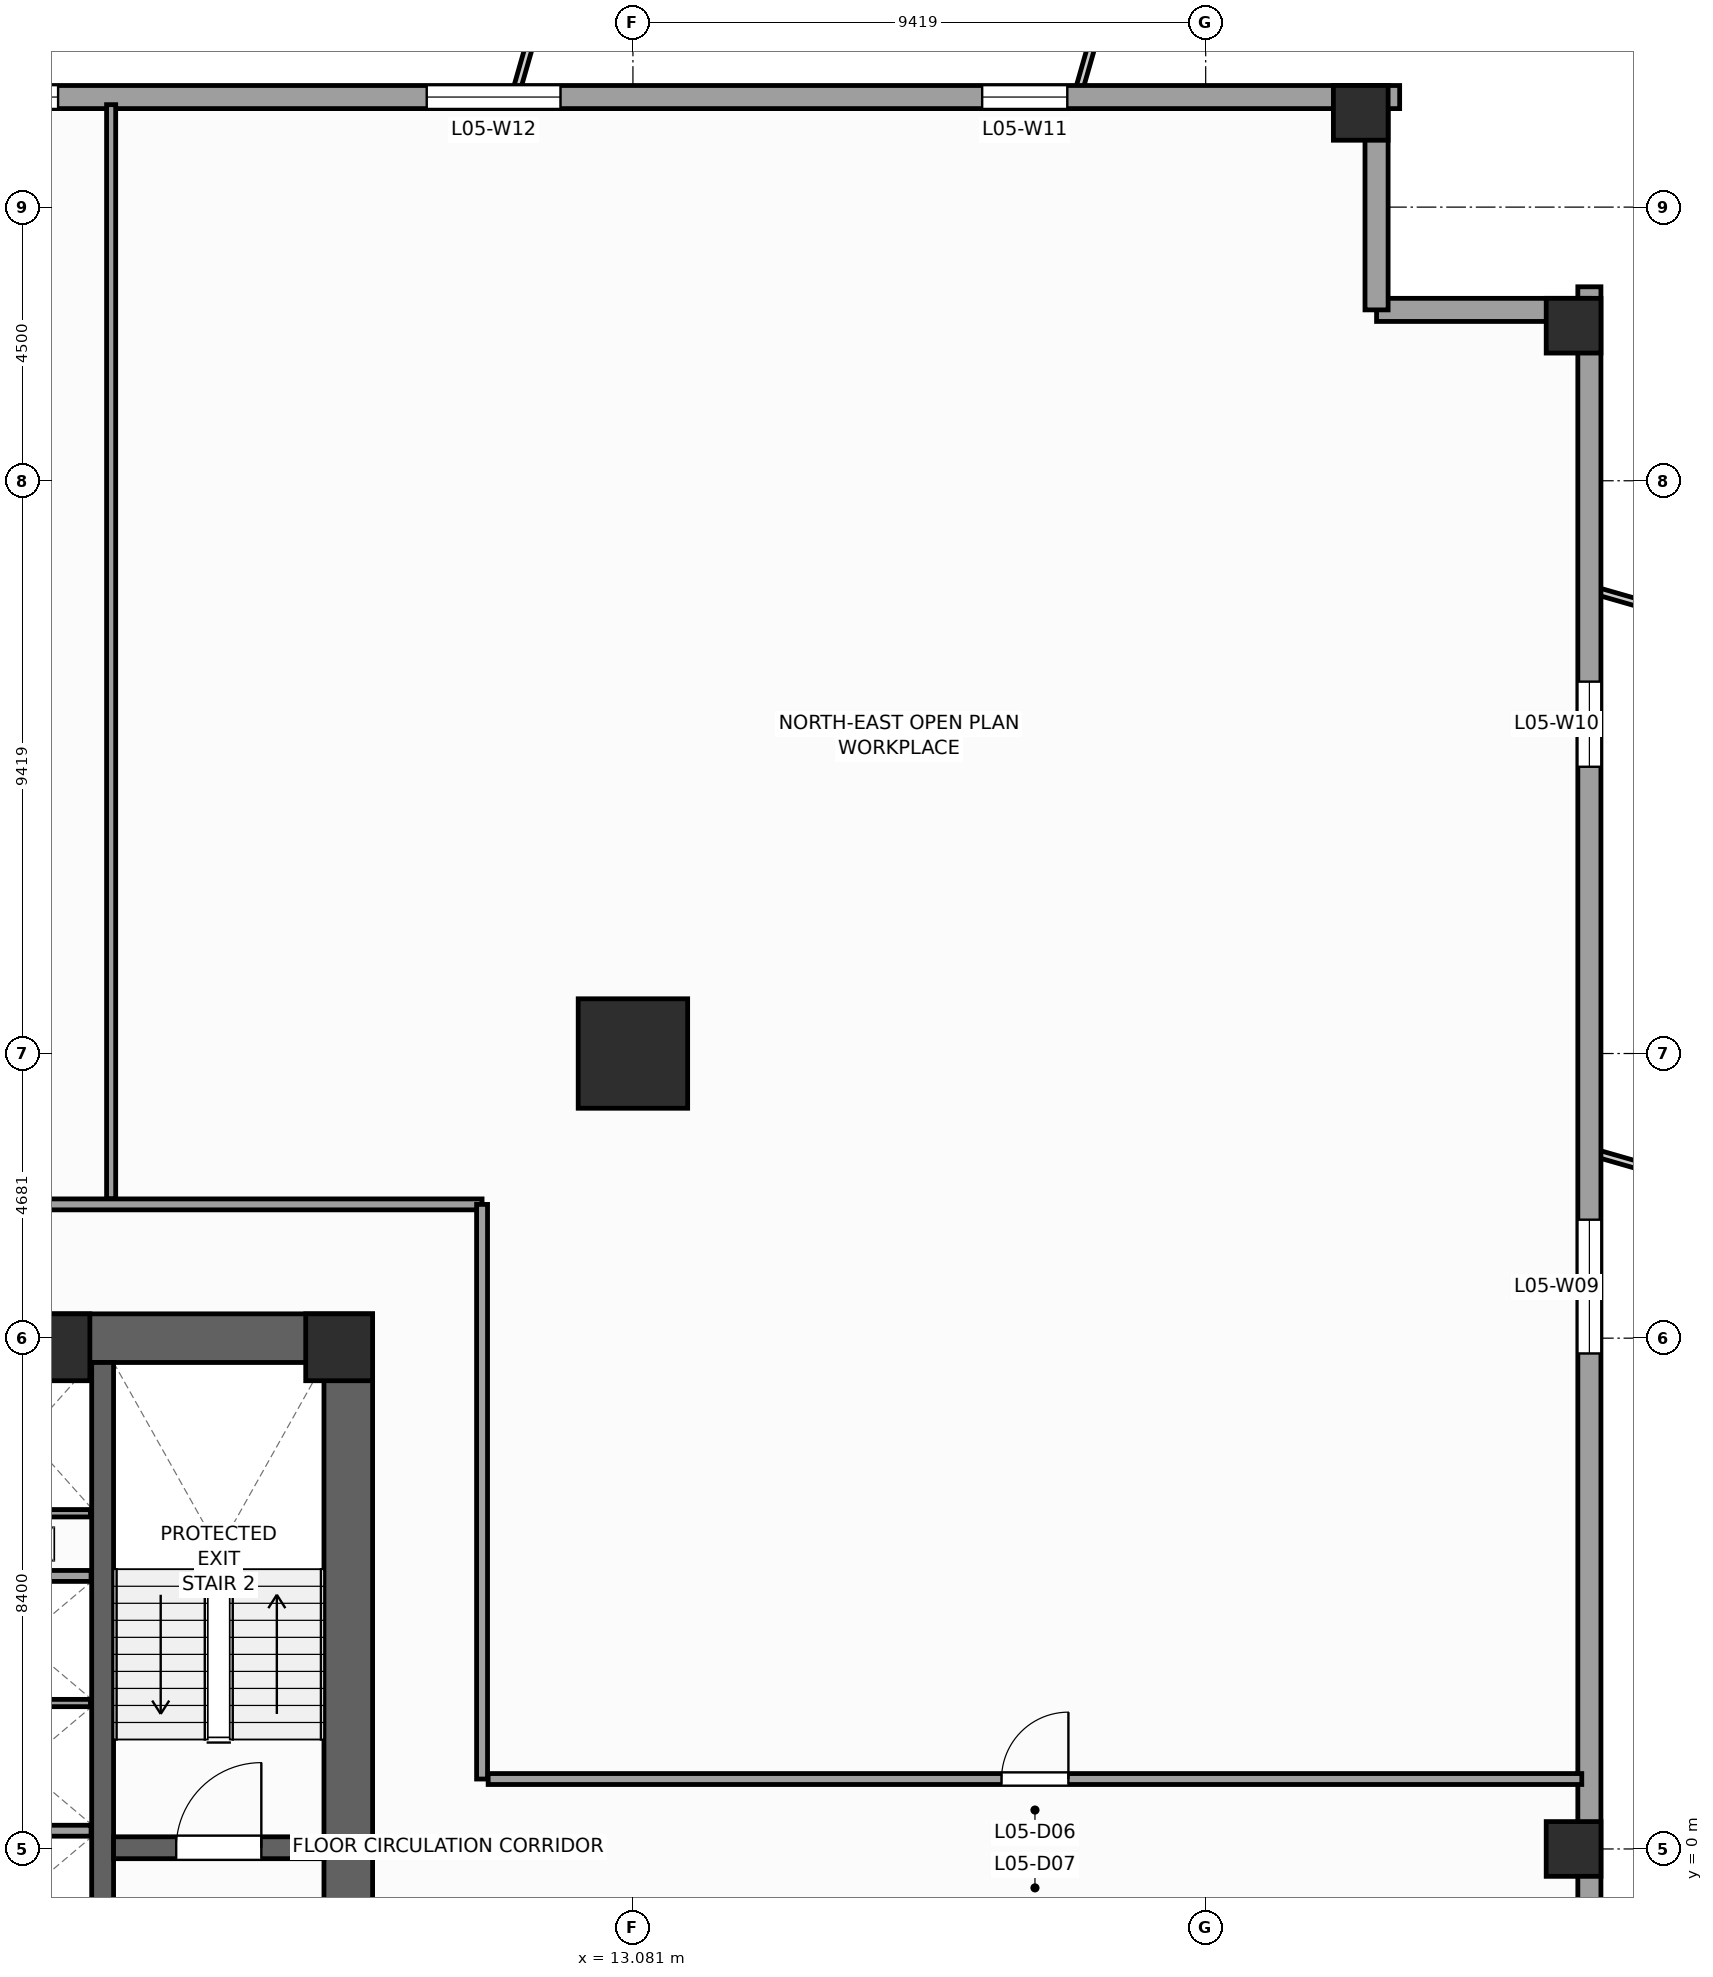
"""IFC4 building model, lengths in metres.
Left out: names, types, materials, properties, quantities, classifications, styles, units other than length and angle.
Written with IfcOpenShell. Run it as: python <this file> out.ifc"""

import sys

from ifc_helpers import new_model, si_unit, direction, frame, frame_2d, origin, origin_2d, place, context, subcontext, project, spatial, rectangle, extrude, source, transform, mapped, element, fill, save


model = new_model("IFC4")
c1 = context("Model", 3, precision=1e-05, world=origin(), true_north=direction((0.0, 1.0)))
c2 = subcontext(c1, "Body", "Model", "MODEL_VIEW")
j1 = project(units=[si_unit("LENGTHUNIT", "METRE"), si_unit("PLANEANGLEUNIT", "RADIAN")], contexts=[c1])
p1 = place(None, origin())
s1 = spatial("IfcSite", under=j1, at=p1, CompositionType="ELEMENT")
p2 = place(p1, origin())
s2 = spatial("IfcBuilding", under=s1, at=p2, CompositionType="ELEMENT")
p3 = place(p2, frame((0.0, 0.0, 26.0)))
s3 = spatial("IfcBuildingStorey", under=s2, at=p3, CompositionType="ELEMENT", Elevation=26.0)
p4 = place(p3, frame((-8.8, 8.4, 0.0), z_axis=(0.0, 0.0, 1.0), x_axis=(1.0, 0.0, 0.0)))
e1 = element("IfcWall", 1, at=p4, inside=s3, PredefinedType="SHEAR", context=c2, shape_type="SweptSolid", body=[
    extrude(rectangle(XDim=17.6, YDim=0.8, at=frame_2d((8.8, 0.0))), origin(), (0.0, 0.0, 1.0), 4.0),
])
p5 = place(p3, frame((8.4, -8.0, 0.0), z_axis=(0.0, 0.0, 1.0), x_axis=(0.0, 1.0, 0.0)))
e2 = element("IfcWall", 2, at=p5, inside=s3, PredefinedType="SHEAR", context=c2, shape_type="SweptSolid", body=[
    extrude(rectangle(XDim=16.0, YDim=0.8, at=frame_2d((8.0, 0.0))), origin(), (0.0, 0.0, 1.0), 4.0),
])
p6 = place(p5, frame((4.69, 0.0, 0.0)))
e3 = element("IfcOpeningElement", 3, at=p6, cuts=e2, PredefinedType="OPENING", context=c2, shape_type="SweptSolid", body=[
    extrude(rectangle(XDim=1.3, YDim=2.2, at=frame_2d((0.65, 1.1))), frame((0.0, 0.41, 0.0), z_axis=(0.0, -1.0, 0.0), x_axis=(1.0, 0.0, 0.0)), (0.0, 0.0, 1.0), 0.82),
])
p7 = place(p3, frame((4.36, -8.0, 0.0), z_axis=(0.0, 0.0, 1.0), x_axis=(0.0, 1.0, 0.0)))
e4 = element("IfcWall", 4, at=p7, inside=s3, PredefinedType="SHEAR", context=c2, shape_type="SweptSolid", body=[
    extrude(rectangle(XDim=16.0, YDim=0.36, at=frame_2d((8.0, 0.0))), origin(), (0.0, 0.0, 1.0), 4.0),
])
p8 = place(p3, frame((4.54, 0.02, 0.0), z_axis=(0.0, 0.0, 1.0), x_axis=(1.0, 0.0, 0.0)))
e5 = element("IfcWall", 5, at=p8, inside=s3, PredefinedType="SHEAR", context=c2, shape_type="SweptSolid", body=[
    extrude(rectangle(XDim=3.46, YDim=0.36, at=frame_2d((1.73, 0.0))), origin(), (0.0, 0.0, 1.0), 4.0),
])
p9 = place(p8, frame((1.03, 0.0, 0.0)))
e6 = element("IfcOpeningElement", 6, at=p9, cuts=e5, PredefinedType="OPENING", context=c2, shape_type="SweptSolid", body=[
    extrude(rectangle(XDim=1.4, YDim=2.2, at=frame_2d((0.7, 1.1))), frame((0.0, 0.19, 0.0), z_axis=(0.0, -1.0, 0.0), x_axis=(1.0, 0.0, 0.0)), (0.0, 0.0, 1.0), 0.38),
])
m1 = source(origin(), c2, "Body", "SweptSolid", [
    extrude(rectangle(XDim=1.1, YDim=1.1, at=origin_2d()), origin(), (0.0, 0.0, 1.0), 4.0),
])
for number, where, z_axis, x_axis in (
    (7, (8.25, 8.25, 0.0), (0.0, 0.0, 1.0), (1.0, 0.0, 0.0)),
    (8, (3.6, 8.25, 0.0), (0.0, 0.0, 1.0), (1.0, 0.0, 0.0)),
):
    element("IfcColumn", number, at=place(p3, frame(where, z_axis=z_axis, x_axis=x_axis)), inside=s3, PredefinedType="PILASTER", context=c2, shape_type="MappedRepresentation", body=[
        mapped(m1, transform((0.0, 0.0, 0.0), scale=1.0)),
    ])
m2 = source(origin(), c2, "Body", "SweptSolid", [
    extrude(rectangle(XDim=1.8, YDim=1.8, at=origin_2d()), origin(), (0.0, 0.0, 1.0), 4.0),
])
p10 = place(p3, frame((13.081, 13.081, 0.0), z_axis=(0.0, 0.0, 1.0), x_axis=(1.0, 0.0, 0.0)))
e9 = element("IfcColumn", 9, at=p10, inside=s3, PredefinedType="COLUMN", context=c2, shape_type="MappedRepresentation", body=[
    mapped(m2, transform((0.0, 0.0, 0.0), scale=1.0)),
])
m3 = source(origin(), c2, "Body", "SweptSolid", [
    extrude(rectangle(XDim=0.9, YDim=0.9, at=origin_2d()), origin(), (0.0, 0.0, 1.0), 4.0),
])
for number, where, z_axis, x_axis in (
    (10, (28.55, 0.0, 0.0), (0.0, 0.0, 1.0), (1.0, 0.0, 0.0)),
    (11, (28.55, 25.05, 0.0), (0.0, 0.0, 1.0), (1.0, 0.0, 0.0)),
    (12, (25.05, 28.55, 0.0), (0.0, 0.0, 1.0), (1.0, 0.0, 0.0)),
):
    element("IfcColumn", number, at=place(p3, frame(where, z_axis=z_axis, x_axis=x_axis)), inside=s3, PredefinedType="COLUMN", context=c2, shape_type="MappedRepresentation", body=[
        mapped(m3, transform((0.0, 0.0, 0.0), scale=1.0)),
    ])
p11 = place(p3, frame((28.81, -25.69, 0.0), z_axis=(0.0, 0.0, 1.0), x_axis=(0.0, 1.0, 0.0)))
e13 = element("IfcWall", 13, at=p11, inside=s3, PredefinedType="STANDARD", context=c2, shape_type="SweptSolid", body=[
    extrude(rectangle(XDim=51.38, YDim=0.38, at=frame_2d((25.69, 0.0))), origin(), (0.0, 0.0, 1.0), 3.12),
])
p12 = place(p11, frame((5.466, 0.0, 0.49)))
e14 = element("IfcOpeningElement", 14, at=p12, cuts=e13, PredefinedType="OPENING", context=c2, shape_type="SweptSolid", body=[
    extrude(rectangle(XDim=1.4, YDim=2.4, at=frame_2d((0.7, 1.2))), frame((0.0, 0.2, 0.0), z_axis=(0.0, -1.0, 0.0), x_axis=(1.0, 0.0, 0.0)), (0.0, 0.0, 1.0), 0.4),
])
p13 = place(p11, frame((13.8, 0.0, 0.49)))
e15 = element("IfcOpeningElement", 15, at=p13, cuts=e13, PredefinedType="OPENING", context=c2, shape_type="SweptSolid", body=[
    extrude(rectangle(XDim=2.2, YDim=2.4, at=frame_2d((1.1, 1.2))), frame((0.0, 0.2, 0.0), z_axis=(0.0, -1.0, 0.0), x_axis=(1.0, 0.0, 0.0)), (0.0, 0.0, 1.0), 0.4),
])
p14 = place(p11, frame((21.312, 0.0, 0.49)))
e16 = element("IfcOpeningElement", 16, at=p14, cuts=e13, PredefinedType="OPENING", context=c2, shape_type="SweptSolid", body=[
    extrude(rectangle(XDim=2.2, YDim=2.4, at=frame_2d((1.1, 1.2))), frame((0.0, 0.2, 0.0), z_axis=(0.0, -1.0, 0.0), x_axis=(1.0, 0.0, 0.0)), (0.0, 0.0, 1.0), 0.4),
])
p15 = place(p11, frame((33.838, 0.0, 0.49)))
e17 = element("IfcOpeningElement", 17, at=p15, cuts=e13, PredefinedType="OPENING", context=c2, shape_type="SweptSolid", body=[
    extrude(rectangle(XDim=2.2, YDim=2.4, at=frame_2d((1.1, 1.2))), frame((0.0, 0.2, 0.0), z_axis=(0.0, -1.0, 0.0), x_axis=(1.0, 0.0, 0.0)), (0.0, 0.0, 1.0), 0.4),
])
p16 = place(p11, frame((43.487, 0.0, 0.49)))
e18 = element("IfcOpeningElement", 18, at=p16, cuts=e13, PredefinedType="OPENING", context=c2, shape_type="SweptSolid", body=[
    extrude(rectangle(XDim=1.4, YDim=2.4, at=frame_2d((0.7, 1.2))), frame((0.0, 0.2, 0.0), z_axis=(0.0, -1.0, 0.0), x_axis=(1.0, 0.0, 0.0)), (0.0, 0.0, 1.0), 0.4),
])
p17 = place(p3, frame((28.81, 25.31, 0.0), z_axis=(0.0, 0.0, 1.0), x_axis=(-1.0, 0.0, 0.0)))
e19 = element("IfcWall", 19, at=p17, inside=s3, PredefinedType="STANDARD", context=c2, shape_type="SweptSolid", body=[
    extrude(rectangle(XDim=3.5, YDim=0.38, at=frame_2d((1.75, 0.0))), origin(), (0.0, 0.0, 1.0), 3.72),
])
p18 = place(p3, frame((25.31, 25.31, 0.0), z_axis=(0.0, 0.0, 1.0), x_axis=(0.0, 1.0, 0.0)))
e20 = element("IfcWall", 20, at=p18, inside=s3, PredefinedType="STANDARD", context=c2, shape_type="SweptSolid", body=[
    extrude(rectangle(XDim=3.69, YDim=0.38, at=frame_2d((1.845, 0.0))), origin(), (0.0, 0.0, 1.0), 3.72),
])
p19 = place(p3, frame((25.69, 28.81, 0.0), z_axis=(0.0, 0.0, 1.0), x_axis=(-1.0, 0.0, 0.0)))
e21 = element("IfcWall", 21, at=p19, inside=s3, PredefinedType="STANDARD", context=c2, shape_type="SweptSolid", body=[
    extrude(rectangle(XDim=51.38, YDim=0.38, at=frame_2d((25.69, 0.0))), origin(), (0.0, 0.0, 1.0), 3.12),
])
p20 = place(p19, frame((30.765, 0.0, 0.0)))
e22 = element("IfcOpeningElement", 22, at=p20, cuts=e21, PredefinedType="OPENING", context=c2, shape_type="SweptSolid", body=[
    extrude(rectangle(XDim=1.05, YDim=2.25, at=frame_2d((0.525, 1.125))), frame((0.0, 0.2, 0.0), z_axis=(0.0, -1.0, 0.0), x_axis=(1.0, 0.0, 0.0)), (0.0, 0.0, 1.0), 0.4),
])
p21 = place(p19, frame((5.466, 0.0, 0.49)))
e23 = element("IfcOpeningElement", 23, at=p21, cuts=e21, PredefinedType="OPENING", context=c2, shape_type="SweptSolid", body=[
    extrude(rectangle(XDim=1.4, YDim=2.4, at=frame_2d((0.7, 1.2))), frame((0.0, 0.2, 0.0), z_axis=(0.0, -1.0, 0.0), x_axis=(1.0, 0.0, 0.0)), (0.0, 0.0, 1.0), 0.4),
])
p22 = place(p19, frame((13.8, 0.0, 0.49)))
e24 = element("IfcOpeningElement", 24, at=p22, cuts=e21, PredefinedType="OPENING", context=c2, shape_type="SweptSolid", body=[
    extrude(rectangle(XDim=2.2, YDim=2.4, at=frame_2d((1.1, 1.2))), frame((0.0, 0.2, 0.0), z_axis=(0.0, -1.0, 0.0), x_axis=(1.0, 0.0, 0.0)), (0.0, 0.0, 1.0), 0.4),
])
p23 = place(p19, frame((22.062, 0.0, 0.49)))
e25 = element("IfcOpeningElement", 25, at=p23, cuts=e21, PredefinedType="OPENING", context=c2, shape_type="SweptSolid", body=[
    extrude(rectangle(XDim=2.2, YDim=2.4, at=frame_2d((1.1, 1.2))), frame((0.0, 0.2, 0.0), z_axis=(0.0, -1.0, 0.0), x_axis=(1.0, 0.0, 0.0)), (0.0, 0.0, 1.0), 0.4),
])
p24 = place(p19, frame((33.838, 0.0, 0.49)))
e26 = element("IfcOpeningElement", 26, at=p24, cuts=e21, PredefinedType="OPENING", context=c2, shape_type="SweptSolid", body=[
    extrude(rectangle(XDim=2.2, YDim=2.4, at=frame_2d((1.1, 1.2))), frame((0.0, 0.2, 0.0), z_axis=(0.0, -1.0, 0.0), x_axis=(1.0, 0.0, 0.0)), (0.0, 0.0, 1.0), 0.4),
])
p25 = place(p19, frame((43.487, 0.0, 0.49)))
e27 = element("IfcOpeningElement", 27, at=p25, cuts=e21, PredefinedType="OPENING", context=c2, shape_type="SweptSolid", body=[
    extrude(rectangle(XDim=1.4, YDim=2.4, at=frame_2d((0.7, 1.2))), frame((0.0, 0.2, 0.0), z_axis=(0.0, -1.0, 0.0), x_axis=(1.0, 0.0, 0.0)), (0.0, 0.0, 1.0), 0.4),
])
for number, where, z_axis, x_axis in (
    (28, (1.89, 0.3, 0.0), (0.0, 0.0, 1.0), (1.0, 0.0, 0.0)),
    (29, (1.89, 4.49, 0.0), (0.0, 0.0, 1.0), (1.0, 0.0, 0.0)),
):
    element("IfcWall", number, at=place(p3, frame(where, z_axis=z_axis, x_axis=x_axis)), inside=s3, PredefinedType="PARTITIONING", context=c2, shape_type="SweptSolid", body=[
        extrude(rectangle(XDim=2.28, YDim=0.18, at=frame_2d((1.14, 0.0))), origin(), (0.0, 0.0, 1.0), 3.72),
    ])
p26 = place(p3, frame((1.9, 2.4, 0.0), z_axis=(0.0, 0.0, 1.0), x_axis=(1.0, 0.0, 0.0)))
e30 = element("IfcWall", 30, at=p26, inside=s3, PredefinedType="PARTITIONING", context=c2, shape_type="SweptSolid", body=[
    extrude(rectangle(XDim=2.26, YDim=0.12, at=frame_2d((1.13, 0.0))), origin(), (0.0, 0.0, 1.0), 3.72),
])
p27 = place(p3, frame((2.06, 5.52, 0.0), z_axis=(0.0, 0.0, 1.0), x_axis=(1.0, 0.0, 0.0)))
e31 = element("IfcWall", 31, at=p27, inside=s3, PredefinedType="PARTITIONING", context=c2, shape_type="SweptSolid", body=[
    extrude(rectangle(XDim=2.1, YDim=0.12, at=frame_2d((1.05, 0.0))), origin(), (0.0, 0.0, 1.0), 3.72),
])
p28 = place(p3, frame((-10.6, 10.6, 0.0), z_axis=(0.0, 0.0, 1.0), x_axis=(1.0, 0.0, 0.0)))
e32 = element("IfcWall", 32, at=p28, inside=s3, PredefinedType="PARTITIONING", context=c2, shape_type="SweptSolid", body=[
    extrude(rectangle(XDim=21.2, YDim=0.18, at=frame_2d((10.6, 0.0))), origin(), (0.0, 0.0, 1.0), 3.72),
])
p29 = place(p28, frame((10.05, 0.0, 0.0)))
e33 = element("IfcOpeningElement", 33, at=p29, cuts=e32, PredefinedType="OPENING", context=c2, shape_type="SweptSolid", body=[
    extrude(rectangle(XDim=1.1, YDim=2.2, at=frame_2d((0.55, 1.1))), frame((0.0, 0.1, 0.0), z_axis=(0.0, -1.0, 0.0), x_axis=(1.0, 0.0, 0.0)), (0.0, 0.0, 1.0), 0.2),
])
p30 = place(p3, frame((10.6, 1.15, 0.0), z_axis=(0.0, 0.0, 1.0), x_axis=(0.0, 1.0, 0.0)))
e34 = element("IfcWall", 34, at=p30, inside=s3, PredefinedType="PARTITIONING", context=c2, shape_type="SweptSolid", body=[
    extrude(rectangle(XDim=9.45, YDim=0.18, at=frame_2d((4.725, 0.0))), origin(), (0.0, 0.0, 1.0), 3.72),
])
p31 = place(p3, frame((10.7, 1.15, 0.0), z_axis=(0.0, 0.0, 1.0), x_axis=(1.0, 0.0, 0.0)))
e35 = element("IfcWall", 35, at=p31, inside=s3, PredefinedType="PARTITIONING", context=c2, shape_type="SweptSolid", body=[
    extrude(rectangle(XDim=17.985, YDim=0.18, at=frame_2d((8.993, 0.0))), origin(), (0.0, 0.0, 1.0), 3.72),
])
p32 = place(p31, frame((8.442, 0.0, 0.0)))
e36 = element("IfcOpeningElement", 36, at=p32, cuts=e35, PredefinedType="OPENING", context=c2, shape_type="SweptSolid", body=[
    extrude(rectangle(XDim=1.1, YDim=2.2, at=frame_2d((0.55, 1.1))), frame((0.0, 0.1, 0.0), z_axis=(0.0, -1.0, 0.0), x_axis=(1.0, 0.0, 0.0)), (0.0, 0.0, 1.0), 0.2),
])
p33 = place(p3, frame((4.5, 10.695, 0.0), z_axis=(0.0, 0.0, 1.0), x_axis=(0.0, 1.0, 0.0)))
e37 = element("IfcWall", 37, at=p33, inside=s3, PredefinedType="PARTITIONING", context=c2, shape_type="SweptSolid", body=[
    extrude(rectangle(XDim=17.99, YDim=0.15, at=frame_2d((8.995, 0.0))), origin(), (0.0, 0.0, 1.0), 3.72),
])
m4 = source(origin(), c2, "Body", "SweptSolid", [
    extrude(rectangle(XDim=2.2, YDim=2.4, at=frame_2d((1.1, 1.2))), frame((0.0, 0.03, 0.0), z_axis=(0.0, -1.0, 0.0), x_axis=(1.0, 0.0, 0.0)), (0.0, 0.0, 1.0), 0.06),
])
p34 = place(p15, origin())
e38 = element("IfcWindow", 38, at=p34, inside=s3, PartitioningType="SINGLE_PANEL", PredefinedType="WINDOW", context=c2, shape_type="MappedRepresentation", body=[
    mapped(m4, transform((0.0, 0.0, 0.0), scale=1.0)),
])
fill(e17, e38)
m5 = source(origin(), c2, "Body", "SweptSolid", [
    extrude(rectangle(XDim=1.4, YDim=2.4, at=frame_2d((0.7, 1.2))), frame((0.0, 0.03, 0.0), z_axis=(0.0, -1.0, 0.0), x_axis=(1.0, 0.0, 0.0)), (0.0, 0.0, 1.0), 0.06),
])
p35 = place(p16, origin())
e39 = element("IfcWindow", 39, at=p35, inside=s3, PartitioningType="SINGLE_PANEL", PredefinedType="WINDOW", context=c2, shape_type="MappedRepresentation", body=[
    mapped(m5, transform((0.0, 0.0, 0.0), scale=1.0)),
])
fill(e18, e39)
p36 = place(p21, origin())
e40 = element("IfcWindow", 40, at=p36, inside=s3, PartitioningType="SINGLE_PANEL", PredefinedType="WINDOW", context=c2, shape_type="MappedRepresentation", body=[
    mapped(m5, transform((0.0, 0.0, 0.0), scale=1.0)),
])
fill(e23, e40)
p37 = place(p22, origin())
e41 = element("IfcWindow", 41, at=p37, inside=s3, PartitioningType="SINGLE_PANEL", PredefinedType="WINDOW", context=c2, shape_type="MappedRepresentation", body=[
    mapped(m4, transform((0.0, 0.0, 0.0), scale=1.0)),
])
fill(e24, e41)
p38 = place(p23, origin())
e42 = element("IfcWindow", 42, at=p38, inside=s3, PartitioningType="SINGLE_PANEL", PredefinedType="WINDOW", context=c2, shape_type="MappedRepresentation", body=[
    mapped(m4, transform((0.0, 0.0, 0.0), scale=1.0)),
])
fill(e25, e42)
m6 = source(origin(), c2, "Body", "SweptSolid", [
    extrude(rectangle(XDim=1.4, YDim=2.2, at=frame_2d((0.7, 1.1))), frame((0.0, 0.025, 0.0), z_axis=(0.0, -1.0, 0.0), x_axis=(1.0, 0.0, 0.0)), (0.0, 0.0, 1.0), 0.05),
])
p39 = place(p9, origin())
e43 = element("IfcDoor", 43, at=p39, inside=s3, OperationType="SINGLE_SWING_RIGHT", PredefinedType="DOOR", context=c2, shape_type="MappedRepresentation", body=[
    mapped(m6, transform((0.0, 0.0, 0.0), scale=1.0)),
])
fill(e6, e43)
m7 = source(origin(), c2, "Body", "SweptSolid", [
    extrude(rectangle(XDim=1.1, YDim=2.2, at=frame_2d((0.55, 1.1))), frame((0.0, 0.025, 0.0), z_axis=(0.0, -1.0, 0.0), x_axis=(1.0, 0.0, 0.0)), (0.0, 0.0, 1.0), 0.05),
])
p40 = place(p32, origin())
e44 = element("IfcDoor", 44, at=p40, inside=s3, OperationType="SINGLE_SWING_RIGHT", PredefinedType="DOOR", context=c2, shape_type="MappedRepresentation", body=[
    mapped(m7, transform((0.0, 0.0, 0.0), scale=1.0)),
])
fill(e36, e44)
save(model, sys.argv[1])
